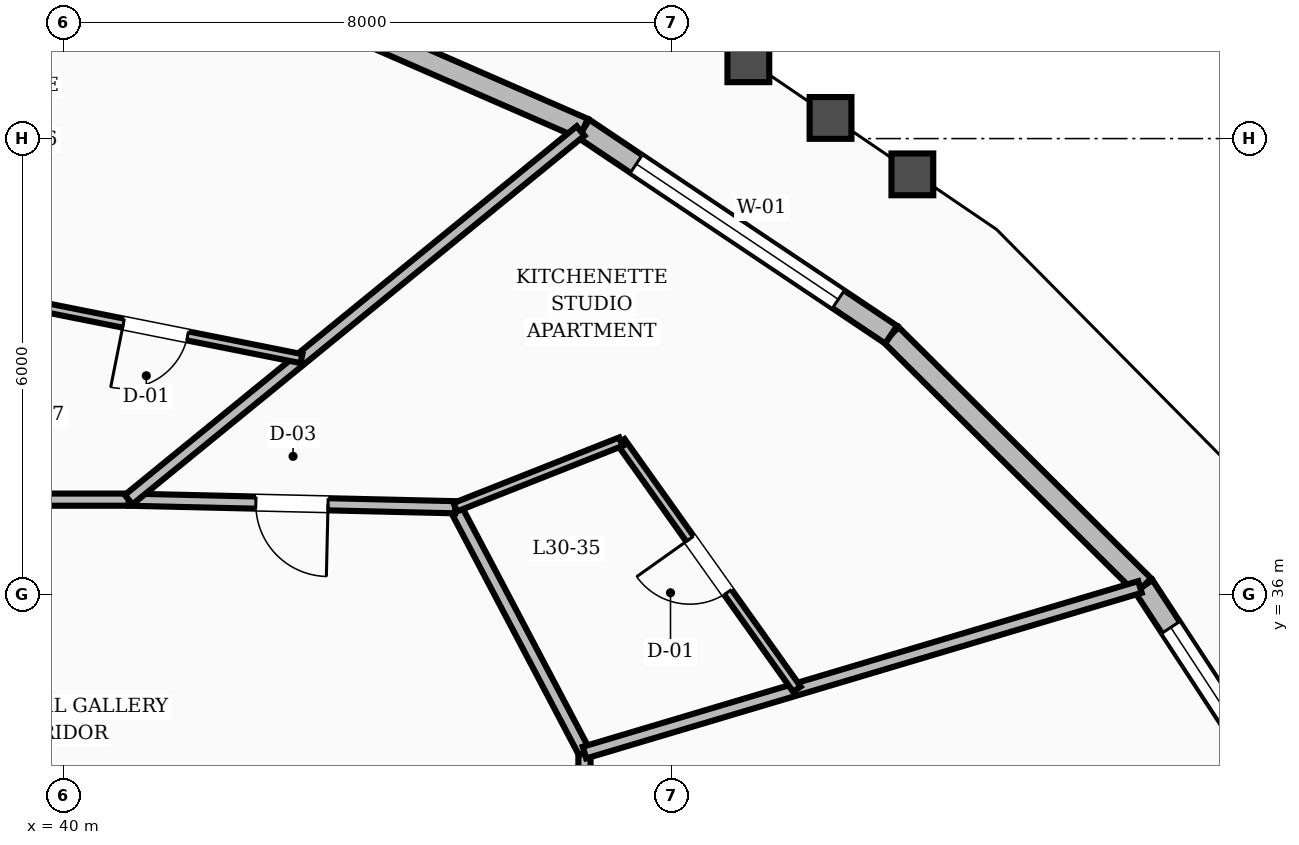
"""IFC4 building model, lengths in metres.
Left out: names, types, materials, properties, quantities, classifications, styles, units other than length and angle.
Written with IfcOpenShell. Run it as: python <this file> out.ifc"""

import sys

from ifc_helpers import new_model, si_unit, direction, frame, frame_2d, origin, place, context, subcontext, project, spatial, rectangle, extrude, element, fill, save


model = new_model("IFC4")
c1 = context("Model", 3, precision=1e-05, world=origin(), true_north=direction((0.0, 1.0)))
c2 = subcontext(c1, "Body", "Model", "MODEL_VIEW")
j1 = project(units=[si_unit("LENGTHUNIT", "METRE"), si_unit("PLANEANGLEUNIT", "RADIAN")], contexts=[c1])
p1 = place(None, origin())
s1 = spatial("IfcSite", under=j1, at=p1, CompositionType="ELEMENT")
p2 = place(p1, origin())
s2 = spatial("IfcBuilding", under=s1, at=p2, CompositionType="ELEMENT")
p3 = place(p2, frame((0.0, 0.0, 120.8)))
s3 = spatial("IfcBuildingStorey", under=s2, at=p3, CompositionType="ELEMENT", Elevation=120.8)
p4 = place(p3, frame((56.674, 32.345, 0.0), z_axis=(0.0, 0.0, 1.0), x_axis=(-0.547716413999, 0.836664048371, 0.0)))
e1 = element("IfcWall", 1, at=p4, inside=s3, PredefinedType="STANDARD", context=c2, shape_type="SweptSolid", body=[
    extrude(rectangle(XDim=4.506, YDim=0.28, at=frame_2d((2.253, 0.0))), origin(), (0.0, 0.0, 1.0), 2.82),
])
p5 = place(p4, frame((0.653, 0.0, 0.8)))
e2 = element("IfcOpeningElement", 2, at=p5, cuts=e1, PredefinedType="OPENING", context=c2, shape_type="SweptSolid", body=[
    extrude(rectangle(XDim=3.2, YDim=1.65, at=frame_2d((1.6, 0.825))), frame((0.0, 0.15, 0.0), z_axis=(0.0, -1.0, 0.0), x_axis=(1.0, 0.0, 0.0)), (0.0, 0.0, 1.0), 0.3),
])
p6 = place(p3, frame((54.206, 36.115, 0.0), z_axis=(0.0, 0.0, 1.0), x_axis=(-0.708876231206, 0.705332892208, 0.0)))
e3 = element("IfcWall", 3, at=p6, inside=s3, PredefinedType="STANDARD", context=c2, shape_type="SweptSolid", body=[
    extrude(rectangle(XDim=4.685, YDim=0.28, at=frame_2d((2.343, 0.0))), origin(), (0.0, 0.0, 1.0), 2.82),
])
p7 = place(p3, frame((50.885, 39.42, 0.0), z_axis=(0.0, 0.0, 1.0), x_axis=(-0.830737301714, 0.556664652678, 0.0)))
e4 = element("IfcWall", 4, at=p7, inside=s3, PredefinedType="STANDARD", context=c2, shape_type="SweptSolid", body=[
    extrude(rectangle(XDim=4.872, YDim=0.28, at=frame_2d((2.436, 0.0))), origin(), (0.0, 0.0, 1.0), 2.82),
])
p8 = place(p7, frame((0.836, 0.0, 0.8)))
e5 = element("IfcOpeningElement", 5, at=p8, cuts=e4, PredefinedType="OPENING", context=c2, shape_type="SweptSolid", body=[
    extrude(rectangle(XDim=3.2, YDim=1.65, at=frame_2d((1.6, 0.825))), frame((0.0, 0.15, 0.0), z_axis=(0.0, -1.0, 0.0), x_axis=(1.0, 0.0, 0.0)), (0.0, 0.0, 1.0), 0.3),
])
p9 = place(p3, frame((46.838, 42.132, 0.0), z_axis=(0.0, 0.0, 1.0), x_axis=(-0.916520644769, 0.399987384441, 0.0)))
e6 = element("IfcWall", 6, at=p9, inside=s3, PredefinedType="STANDARD", context=c2, shape_type="SweptSolid", body=[
    extrude(rectangle(XDim=5.038, YDim=0.28, at=frame_2d((2.519, 0.0))), origin(), (0.0, 0.0, 1.0), 2.82),
])
p10 = place(p3, frame((46.85, 30.151, 0.0), z_axis=(0.0, 0.0, 1.0), x_axis=(0.0, 1.0, 0.0)))
e7 = element("IfcWall", 7, at=p10, inside=s3, PredefinedType="SOLIDWALL", context=c2, shape_type="SweptSolid", body=[
    extrude(rectangle(XDim=3.771, YDim=0.16, at=frame_2d((1.886, 0.0))), origin(), (0.0, 0.0, 1.0), 2.8),
])
p11 = place(p10, frame((1.411, 0.0, 0.0)))
e8 = element("IfcOpeningElement", 8, at=p11, cuts=e7, PredefinedType="OPENING", context=c2, shape_type="SweptSolid", body=[
    extrude(rectangle(XDim=0.95, YDim=2.1, at=frame_2d((0.475, 1.05))), frame((0.0, 0.09, 0.0), z_axis=(0.0, -1.0, 0.0), x_axis=(1.0, 0.0, 0.0)), (0.0, 0.0, 1.0), 0.18),
])
p12 = place(p3, frame((46.85, 33.923, 0.0), z_axis=(0.0, 0.0, 1.0), x_axis=(-0.466093963429, 0.884735224378, 0.0)))
e9 = element("IfcWall", 9, at=p12, inside=s3, PredefinedType="SOLIDWALL", context=c2, shape_type="SweptSolid", body=[
    extrude(rectangle(XDim=3.648, YDim=0.16, at=frame_2d((1.824, 0.0))), origin(), (0.0, 0.0, 1.0), 2.8),
])
p13 = place(p3, frame((45.15, 37.15, 0.0), z_axis=(0.0, 0.0, 1.0), x_axis=(-0.999728709658, 0.023291781507, 0.0)))
e10 = element("IfcWall", 10, at=p13, inside=s3, PredefinedType="SOLIDWALL", context=c2, shape_type="SweptSolid", body=[
    extrude(rectangle(XDim=4.298, YDim=0.16, at=frame_2d((2.149, 0.0))), origin(), (0.0, 0.0, 1.0), 2.8),
])
p14 = place(p13, frame((1.674, 0.0, 0.0)))
e11 = element("IfcOpeningElement", 11, at=p14, cuts=e10, PredefinedType="OPENING", context=c2, shape_type="SweptSolid", body=[
    extrude(rectangle(XDim=0.95, YDim=2.1, at=frame_2d((0.475, 1.05))), frame((0.0, 0.09, 0.0), z_axis=(0.0, -1.0, 0.0), x_axis=(1.0, 0.0, 0.0)), (0.0, 0.0, 1.0), 0.18),
])
p15 = place(p3, frame((40.854, 37.25, 0.0), z_axis=(0.0, 0.0, 1.0), x_axis=(-1.0, 0.0, 0.0)))
e12 = element("IfcWall", 12, at=p15, inside=s3, PredefinedType="SOLIDWALL", context=c2, shape_type="SweptSolid", body=[
    extrude(rectangle(XDim=3.365, YDim=0.16, at=frame_2d((1.683, 0.0))), origin(), (0.0, 0.0, 1.0), 2.8),
])
p16 = place(p3, frame((46.85, 33.923, 0.0), z_axis=(0.0, 0.0, 1.0), x_axis=(0.958328823474, 0.285667404685, 0.0)))
e13 = element("IfcWall", 13, at=p16, inside=s3, PredefinedType="SOLIDWALL", context=c2, shape_type="SweptSolid", body=[
    extrude(rectangle(XDim=7.626, YDim=0.16, at=frame_2d((3.813, 0.0))), origin(), (0.0, 0.0, 1.0), 2.8),
])
p17 = place(p3, frame((49.645, 34.756, 0.0), z_axis=(0.0, 0.0, 1.0), x_axis=(-0.579584195977, 0.814912363248, 0.0)))
e14 = element("IfcWall", 14, at=p17, inside=s3, PredefinedType="PARTITIONING", context=c2, shape_type="SweptSolid", body=[
    extrude(rectangle(XDim=3.996, YDim=0.12, at=frame_2d((1.998, 0.0))), origin(), (0.0, 0.0, 1.0), 2.8),
])
p18 = place(p17, frame((1.568, 0.0, 0.0)))
e15 = element("IfcOpeningElement", 15, at=p18, cuts=e14, PredefinedType="OPENING", context=c2, shape_type="SweptSolid", body=[
    extrude(rectangle(XDim=0.86, YDim=2.1, at=frame_2d((0.43, 1.05))), frame((0.0, 0.07, 0.0), z_axis=(0.0, -1.0, 0.0), x_axis=(1.0, 0.0, 0.0)), (0.0, 0.0, 1.0), 0.14),
])
p19 = place(p3, frame((45.15, 37.15, 0.0), z_axis=(0.0, 0.0, 1.0), x_axis=(0.929814039577, 0.368029688755, 0.0)))
e16 = element("IfcWall", 16, at=p19, inside=s3, PredefinedType="PARTITIONING", context=c2, shape_type="SweptSolid", body=[
    extrude(rectangle(XDim=2.344, YDim=0.12, at=frame_2d((1.172, 0.0))), origin(), (0.0, 0.0, 1.0), 2.8),
])
p20 = place(p3, frame((40.854, 37.25, 0.0), z_axis=(0.0, 0.0, 1.0), x_axis=(0.774866661355, 0.632124716429, 0.0)))
e17 = element("IfcWall", 17, at=p20, inside=s3, PredefinedType="SOLIDWALL", context=c2, shape_type="SweptSolid", body=[
    extrude(rectangle(XDim=7.673, YDim=0.16, at=frame_2d((3.836, 0.0))), origin(), (0.0, 0.0, 1.0), 2.8),
])
p21 = place(p3, frame((43.127, 39.105, 0.0), z_axis=(0.0, 0.0, 1.0), x_axis=(-0.980693200797, 0.195552667868, 0.0)))
e18 = element("IfcWall", 18, at=p21, inside=s3, PredefinedType="PARTITIONING", context=c2, shape_type="SweptSolid", body=[
    extrude(rectangle(XDim=3.917, YDim=0.12, at=frame_2d((1.958, 0.0))), origin(), (0.0, 0.0, 1.0), 2.8),
])
p22 = place(p21, frame((1.528, 0.0, 0.0)))
e19 = element("IfcOpeningElement", 19, at=p22, cuts=e18, PredefinedType="OPENING", context=c2, shape_type="SweptSolid", body=[
    extrude(rectangle(XDim=0.86, YDim=2.1, at=frame_2d((0.43, 1.05))), frame((0.0, 0.07, 0.0), z_axis=(0.0, -1.0, 0.0), x_axis=(1.0, 0.0, 0.0)), (0.0, 0.0, 1.0), 0.14),
])
p23 = place(p5, origin())
e20 = element("IfcWindow", 20, at=p23, inside=s3, PartitioningType="SINGLE_PANEL", PredefinedType="WINDOW", context=c2, shape_type="SweptSolid", body=[
    extrude(rectangle(XDim=3.2, YDim=1.65, at=frame_2d((1.6, 0.825))), frame((0.0, 0.03, 0.0), z_axis=(0.0, -1.0, 0.0), x_axis=(1.0, 0.0, 0.0)), (0.0, 0.0, 1.0), 0.06),
])
fill(e2, e20)
p24 = place(p8, origin())
e21 = element("IfcWindow", 21, at=p24, inside=s3, PartitioningType="SINGLE_PANEL", PredefinedType="WINDOW", context=c2, shape_type="SweptSolid", body=[
    extrude(rectangle(XDim=3.2, YDim=1.65, at=frame_2d((1.6, 0.825))), frame((0.0, 0.03, 0.0), z_axis=(0.0, -1.0, 0.0), x_axis=(1.0, 0.0, 0.0)), (0.0, 0.0, 1.0), 0.06),
])
fill(e5, e21)
p25 = place(p18, origin())
e22 = element("IfcDoor", 22, at=p25, inside=s3, OperationType="SINGLE_SWING_RIGHT", PredefinedType="DOOR", context=c2, shape_type="SweptSolid", body=[
    extrude(rectangle(XDim=0.86, YDim=2.1, at=frame_2d((0.43, 1.05))), frame((0.0, 0.025, 0.0), z_axis=(0.0, -1.0, 0.0), x_axis=(1.0, 0.0, 0.0)), (0.0, 0.0, 1.0), 0.05),
])
fill(e15, e22)
p26 = place(p14, origin())
e23 = element("IfcDoor", 23, at=p26, inside=s3, OperationType="SINGLE_SWING_LEFT", PredefinedType="DOOR", context=c2, shape_type="SweptSolid", body=[
    extrude(rectangle(XDim=0.95, YDim=2.1, at=frame_2d((0.475, 1.05))), frame((0.0, 0.025, 0.0), z_axis=(0.0, -1.0, 0.0), x_axis=(1.0, 0.0, 0.0)), (0.0, 0.0, 1.0), 0.05),
])
fill(e11, e23)
p27 = place(p22, origin())
e24 = element("IfcDoor", 24, at=p27, inside=s3, OperationType="SINGLE_SWING_RIGHT", PredefinedType="DOOR", context=c2, shape_type="SweptSolid", body=[
    extrude(rectangle(XDim=0.86, YDim=2.1, at=frame_2d((0.43, 1.05))), frame((0.0, 0.025, 0.0), z_axis=(0.0, -1.0, 0.0), x_axis=(1.0, 0.0, 0.0)), (0.0, 0.0, 1.0), 0.05),
])
fill(e19, e24)
save(model, sys.argv[1])
